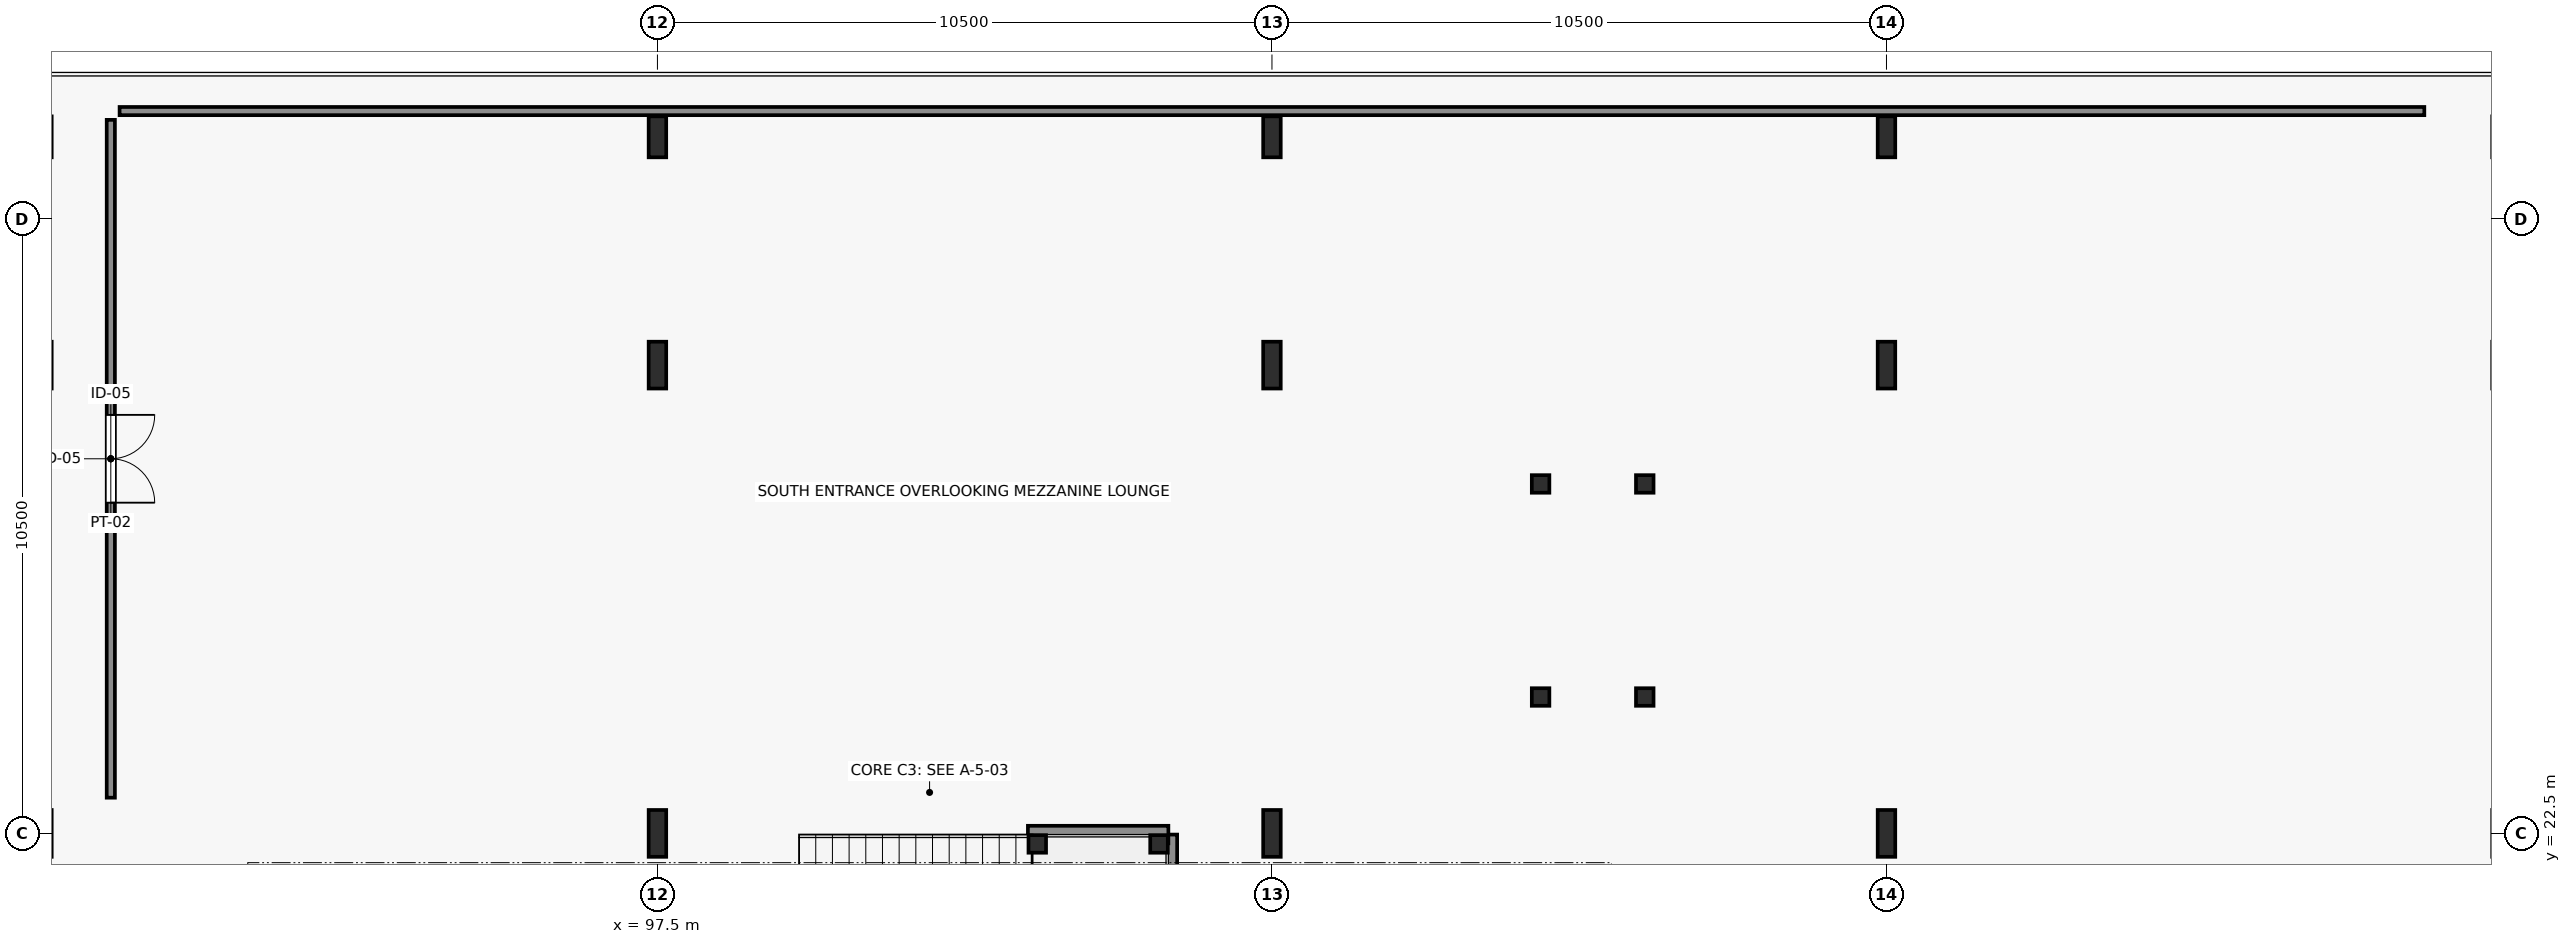
"""IFC4 building model, lengths in metres.
Left out: names, types, materials, properties, quantities, classifications, styles, units other than length and angle.
Written with IfcOpenShell. Run it as: python <this file> out.ifc"""

import sys

from ifc_helpers import new_model, si_unit, direction, frame, frame_2d, origin, origin_2d, place, context, subcontext, project, spatial, rectangle, hollow_rectangle, i_section, extrude, element, fill, save


model = new_model("IFC4")
c1 = context("Model", 3, precision=1e-05, world=origin(), true_north=direction((0.0, 1.0)))
c2 = subcontext(c1, "Body", "Model", "MODEL_VIEW")
j1 = project(units=[si_unit("LENGTHUNIT", "METRE"), si_unit("PLANEANGLEUNIT", "RADIAN")], contexts=[c1])
p1 = place(None, origin())
s1 = spatial("IfcSite", under=j1, at=p1, CompositionType="ELEMENT")
p2 = place(p1, origin())
s2 = spatial("IfcBuilding", under=s1, at=p2, CompositionType="ELEMENT")
p3 = place(p2, frame((0.0, 0.0, 4.8)))
s3 = spatial("IfcBuildingStorey", under=s2, at=p3, CompositionType="ELEMENT", Elevation=4.8)
for number, where, z_axis, x_axis in (
    (1, (97.5, 22.5, 0.0), (0.0, 0.0, 1.0), (1.0, 0.0, 0.0)),
    (2, (108.0, 22.5, 0.0), (0.0, 0.0, 1.0), (1.0, 0.0, 0.0)),
    (3, (118.5, 22.5, 0.0), (0.0, 0.0, 1.0), (1.0, 0.0, 0.0)),
    (4, (97.5, 30.5, 0.0), (0.0, 0.0, 1.0), (1.0, 0.0, 0.0)),
    (5, (108.0, 30.5, 0.0), (0.0, 0.0, 1.0), (1.0, 0.0, 0.0)),
    (6, (118.5, 30.5, 0.0), (0.0, 0.0, 1.0), (1.0, 0.0, 0.0)),
):
    element("IfcColumn", number, at=place(p3, frame(where, z_axis=z_axis, x_axis=x_axis)), inside=s3, PredefinedType="COLUMN", context=c2, shape_type="SweptSolid", body=[
        extrude(i_section(OverallWidth=0.3, OverallDepth=0.8, WebThickness=0.018, FlangeThickness=0.033, FilletRadius=0.03, at=origin_2d()), origin(), (0.0, 0.0, 1.0), 4.815),
    ])
for number, where, z_axis, x_axis in (
    (7, (97.5, 34.4, 0.0), (0.0, 0.0, 1.0), (1.0, 0.0, 0.0)),
    (8, (108.0, 34.4, 0.0), (0.0, 0.0, 1.0), (1.0, 0.0, 0.0)),
    (9, (118.5, 34.4, 0.0), (0.0, 0.0, 1.0), (1.0, 0.0, 0.0)),
):
    element("IfcColumn", number, at=place(p3, frame(where, z_axis=z_axis, x_axis=x_axis)), inside=s3, PredefinedType="COLUMN", context=c2, shape_type="SweptSolid", body=[
        extrude(i_section(OverallWidth=0.3, OverallDepth=0.7, WebThickness=0.017, FlangeThickness=0.032, FilletRadius=0.027, at=origin_2d()), origin(), (0.0, 0.0, 1.0), 4.815),
    ])
p4 = place(p3, frame((88.16, 34.69, 0.0), z_axis=(0.0, 0.0, 1.0), x_axis=(0.0, -1.0, 0.0)))
e10 = element("IfcWall", 10, at=p4, inside=s3, PredefinedType="PARTITIONING", context=c2, shape_type="SweptSolid", body=[
    extrude(rectangle(XDim=11.58, YDim=0.14, at=frame_2d((5.79, 0.0))), origin(), (0.0, 0.0, 1.0), 4.235),
])
p5 = place(p4, frame((5.04, 0.0, 0.0)))
e11 = element("IfcOpeningElement", 11, at=p5, cuts=e10, PredefinedType="OPENING", context=c2, shape_type="SweptSolid", body=[
    extrude(rectangle(XDim=1.5, YDim=2.2, at=frame_2d((0.75, 1.1))), frame((0.0, 0.08, 0.0), z_axis=(0.0, -1.0, 0.0), x_axis=(1.0, 0.0, 0.0)), (0.0, 0.0, 1.0), 0.16),
])
p6 = place(p3, frame((88.31, 34.84, 0.0), z_axis=(0.0, 0.0, 1.0), x_axis=(1.0, 0.0, 0.0)))
e12 = element("IfcWall", 12, at=p6, inside=s3, PredefinedType="PARTITIONING", context=c2, shape_type="SweptSolid", body=[
    extrude(rectangle(XDim=39.38, YDim=0.14, at=frame_2d((19.69, 0.0))), origin(), (0.0, 0.0, 1.0), 3.435),
])
p7 = place(p3, frame((106.23, 17.92, 0.0), z_axis=(0.0, 0.0, 1.0), x_axis=(0.0, 1.0, 0.0)))
e13 = element("IfcWall", 13, at=p7, inside=s3, PredefinedType="SHEAR", context=c2, shape_type="SweptSolid", body=[
    extrude(rectangle(XDim=4.56, YDim=0.3, at=frame_2d((2.28, 0.0))), origin(), (0.0, 0.0, 1.0), 4.235),
])
p8 = place(p3, frame((106.23, 22.48, 0.0), z_axis=(0.0, 0.0, 1.0), x_axis=(-1.0, 0.0, 0.0)))
e14 = element("IfcWall", 14, at=p8, inside=s3, PredefinedType="SHEAR", context=c2, shape_type="SweptSolid", body=[
    extrude(rectangle(XDim=2.4, YDim=0.3, at=frame_2d((1.2, 0.0))), origin(), (0.0, 0.0, 1.0), 4.235),
])
for number, where, z_axis, x_axis in (
    (15, (106.07, 22.32, 0.0), (0.0, 0.0, 1.0), (1.0, 0.0, 0.0)),
    (16, (103.99, 22.32, 0.0), (0.0, 0.0, 1.0), (1.0, 0.0, 0.0)),
):
    element("IfcColumn", number, at=place(p3, frame(where, z_axis=z_axis, x_axis=x_axis)), inside=s3, PredefinedType="COLUMN", context=c2, shape_type="SweptSolid", body=[
        extrude(hollow_rectangle(XDim=0.3, YDim=0.3, WallThickness=0.016, at=origin_2d()), origin(), (0.0, 0.0, 1.0), 2.18),
    ])
for number, where, z_axis, x_axis in (
    (17, (112.59, 24.83, 0.0), (0.0, 0.0, 1.0), (1.0, 0.0, 0.0)),
    (18, (114.37, 24.83, 0.0), (0.0, 0.0, 1.0), (1.0, 0.0, 0.0)),
    (19, (114.37, 28.47, 0.0), (0.0, 0.0, 1.0), (1.0, 0.0, 0.0)),
    (20, (112.59, 28.47, 0.0), (0.0, 0.0, 1.0), (1.0, 0.0, 0.0)),
):
    element("IfcColumn", number, at=place(p3, frame(where, z_axis=z_axis, x_axis=x_axis)), inside=s3, PredefinedType="COLUMN", context=c2, shape_type="SweptSolid", body=[
        extrude(hollow_rectangle(XDim=0.3, YDim=0.3, WallThickness=0.016, at=origin_2d()), origin(), (0.0, 0.0, 1.0), 5.0),
    ])
p9 = place(p5, origin())
e21 = element("IfcDoor", 21, at=p9, inside=s3, OperationType="DOUBLE_DOOR_SINGLE_SWING", PredefinedType="DOOR", context=c2, shape_type="SweptSolid", body=[
    extrude(rectangle(XDim=1.5, YDim=2.2, at=frame_2d((0.75, 1.1))), frame((0.0, 0.025, 0.0), z_axis=(0.0, -1.0, 0.0), x_axis=(1.0, 0.0, 0.0)), (0.0, 0.0, 1.0), 0.05),
])
fill(e11, e21)
save(model, sys.argv[1])
